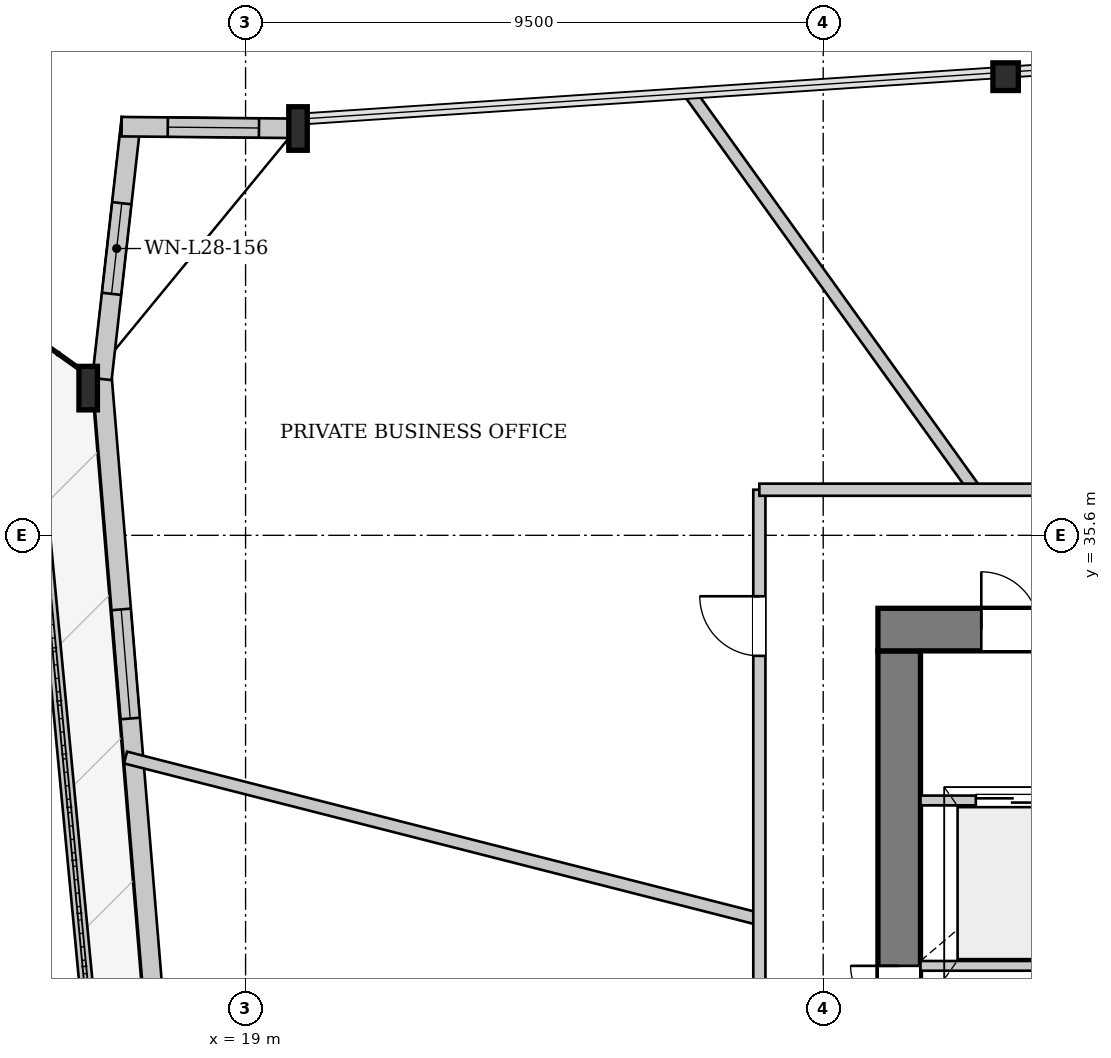
"""IFC4 building model, lengths in metres.
Left out: names, types, materials, properties, quantities, classifications, styles, units other than length and angle.
Written with IfcOpenShell. Run it as: python <this file> out.ifc"""

import sys

from ifc_helpers import new_model, si_unit, direction, frame, frame_2d, origin, origin_2d, place, context, subcontext, project, spatial, rectangle, i_section, extrude, source, transform, mapped, element, fill, save


model = new_model("IFC4")
c1 = context("Model", 3, precision=1e-05, world=origin(), true_north=direction((0.0, 1.0)))
c2 = subcontext(c1, "Body", "Model", "MODEL_VIEW")
j1 = project(units=[si_unit("LENGTHUNIT", "METRE"), si_unit("PLANEANGLEUNIT", "RADIAN")], contexts=[c1])
p1 = place(None, origin())
s1 = spatial("IfcSite", under=j1, at=p1, CompositionType="ELEMENT")
p2 = place(p1, origin())
s2 = spatial("IfcBuilding", under=s1, at=p2, CompositionType="ELEMENT")
p3 = place(p2, frame((0.0, 0.0, 109.25)))
s3 = spatial("IfcBuildingStorey", under=s2, at=p3, CompositionType="ELEMENT", Elevation=109.25)
m1 = source(origin(), c2, "Body", "SweptSolid", [
    extrude(i_section(OverallWidth=0.418, OverallDepth=0.455, WebThickness=0.038, FlangeThickness=0.059, at=origin_2d()), origin(), (0.0, 0.0, 1.0), 3.399),
])
p4 = place(p3, frame((31.631, 43.224, 0.0), z_axis=(-0.077283730653, -0.04797911903, 0.995854019982), x_axis=(0.527441478949, -0.849591364295, 0.0)))
e1 = element("IfcColumn", 1, at=p4, inside=s3, PredefinedType="COLUMN", context=c2, shape_type="MappedRepresentation", body=[
    mapped(m1, transform((0.0, 0.0, 0.0), x_axis=(1.0, 0.0, 0.0), y_axis=(0.0, 1.0, 0.0), z_axis=(0.0, 0.0, 1.0), scale=1.0)),
])
m2 = source(origin(), c2, "Body", "SweptSolid", [
    extrude(i_section(OverallWidth=0.304, OverallDepth=0.716, WebThickness=0.021, FlangeThickness=0.04, at=origin_2d()), origin(), (0.0, 0.0, 1.0), 3.408),
])
p5 = place(p3, frame((19.98, 42.451, 0.0), z_axis=(-0.069050358735, -0.094407025739, 0.99313612433), x_axis=(0.80714420153, -0.59035433253, 0.0)))
e2 = element("IfcColumn", 2, at=p5, inside=s3, PredefinedType="COLUMN", context=c2, shape_type="MappedRepresentation", body=[
    mapped(m2, transform((0.0, 0.0, 0.0), x_axis=(1.0, 0.0, 0.0), y_axis=(0.0, 1.0, 0.0), z_axis=(0.0, 0.0, 1.0), scale=1.0)),
])
m3 = source(origin(), c2, "Body", "SweptSolid", [
    extrude(i_section(OverallWidth=0.304, OverallDepth=0.716, WebThickness=0.021, FlangeThickness=0.04, at=origin_2d()), origin(), (0.0, 0.0, 1.0), 3.404),
])
p6 = place(p3, frame((16.479, 38.188, 0.0), z_axis=(-0.039659803431, -0.098324756788, 0.994363787652), x_axis=(0.927399841512, -0.374071562623, 0.0)))
e3 = element("IfcColumn", 3, at=p6, inside=s3, PredefinedType="COLUMN", context=c2, shape_type="MappedRepresentation", body=[
    mapped(m3, transform((0.0, 0.0, 0.0), x_axis=(1.0, 0.0, 0.0), y_axis=(0.0, 1.0, 0.0), z_axis=(0.0, 0.0, 1.0), scale=1.0)),
])
p7 = place(p3, frame((18.139, 20.062, 0.0), z_axis=(0.0, 0.0, 1.0), x_axis=(-0.082462696948, 0.996594151905, 0.0)))
e4 = element("IfcWall", 4, at=p7, inside=s3, PredefinedType="SOLIDWALL", context=c2, shape_type="SweptSolid", body=[
    extrude(rectangle(XDim=18.202, YDim=0.32, at=frame_2d((9.101, 0.0))), origin(), (0.0, 0.0, 1.0), 2.692),
])
p8 = place(p7, frame((5.275, 0.0, 0.0)))
e5 = element("IfcOpeningElement", 5, at=p8, cuts=e4, PredefinedType="OPENING", context=c2, shape_type="SweptSolid", body=[
    extrude(rectangle(XDim=1.1, YDim=2.3, at=frame_2d((0.55, 1.15))), frame((0.0, 0.17, 0.0), z_axis=(0.0, -1.0, 0.0), x_axis=(1.0, 0.0, 0.0)), (0.0, 0.0, 1.0), 0.34),
])
p9 = place(p7, frame((12.569, 0.0, 0.372)))
e6 = element("IfcOpeningElement", 6, at=p9, cuts=e4, PredefinedType="OPENING", context=c2, shape_type="SweptSolid", body=[
    extrude(rectangle(XDim=1.8, YDim=2.2, at=frame_2d((0.9, 1.1))), frame((0.0, 0.17, 0.0), z_axis=(0.0, -1.0, 0.0), x_axis=(1.0, 0.0, 0.0)), (0.0, 0.0, 1.0), 0.34),
])
p10 = place(p3, frame((16.638, 38.17, 0.0), z_axis=(0.0, 0.0, 1.0), x_axis=(0.112143625954, 0.993692008199, 0.0)))
e7 = element("IfcWall", 7, at=p10, inside=s3, PredefinedType="SOLIDWALL", context=c2, shape_type="SweptSolid", body=[
    extrude(rectangle(XDim=4.319, YDim=0.32, at=frame_2d((2.16, 0.0))), origin(), (0.0, 0.0, 1.0), 2.692),
])
p11 = place(p10, frame((1.41, 0.0, 0.272)))
e8 = element("IfcOpeningElement", 8, at=p11, cuts=e7, PredefinedType="OPENING", context=c2, shape_type="SweptSolid", body=[
    extrude(rectangle(XDim=1.5, YDim=2.3, at=frame_2d((0.75, 1.15))), frame((0.0, 0.17, 0.0), z_axis=(0.0, -1.0, 0.0), x_axis=(1.0, 0.0, 0.0)), (0.0, 0.0, 1.0), 0.34),
])
p12 = place(p3, frame((16.962, 42.32, 0.0), z_axis=(0.0, 0.0, 1.0), x_axis=(0.999952850652, -0.009710637054, 0.0)))
e9 = element("IfcWall", 9, at=p12, inside=s3, PredefinedType="SOLIDWALL", context=c2, shape_type="SweptSolid", body=[
    extrude(rectangle(XDim=3.017, YDim=0.32, at=frame_2d((1.509, 0.0))), origin(), (0.0, 0.0, 1.0), 2.692),
])
p13 = place(p12, frame((0.759, 0.0, 0.272)))
e10 = element("IfcOpeningElement", 10, at=p13, cuts=e9, PredefinedType="OPENING", context=c2, shape_type="SweptSolid", body=[
    extrude(rectangle(XDim=1.5, YDim=2.3, at=frame_2d((0.75, 1.15))), frame((0.0, 0.17, 0.0), z_axis=(0.0, -1.0, 0.0), x_axis=(1.0, 0.0, 0.0)), (0.0, 0.0, 1.0), 0.34),
])
p14 = place(p3, frame((15.501, 37.451, 0.0), z_axis=(0.0, 0.0, 1.0), x_axis=(0.094440121339, -0.995530543721, 0.0)))
e11 = element("IfcWall", 11, at=p14, inside=s3, PredefinedType="PARAPET", context=c2, shape_type="SweptSolid", body=[
    extrude(rectangle(XDim=16.206, YDim=0.22, at=frame_2d((8.103, 0.0))), origin(), (0.0, 0.0, 1.0), 0.3),
])
p15 = place(p3, frame((29.75, 19.5, 0.0), z_axis=(0.0, 0.0, 1.0), x_axis=(0.0, 1.0, 0.0)))
e12 = element("IfcWall", 12, at=p15, inside=s3, PredefinedType="SHEAR", context=c2, shape_type="SweptSolid", body=[
    extrude(rectangle(XDim=14.2, YDim=0.7, at=frame_2d((7.1, 0.0))), origin(), (0.0, 0.0, 1.0), 3.3),
])
p16 = place(p15, frame((7.42, 0.0, 0.0)))
e13 = element("IfcOpeningElement", 13, at=p16, cuts=e12, PredefinedType="OPENING", context=c2, shape_type="SweptSolid", body=[
    extrude(rectangle(XDim=1.6, YDim=2.2, at=frame_2d((0.8, 1.1))), frame((0.0, 0.36, 0.0), z_axis=(0.0, -1.0, 0.0), x_axis=(1.0, 0.0, 0.0)), (0.0, 0.0, 1.0), 0.72),
])
p17 = place(p3, frame((29.4, 34.05, 0.0), z_axis=(0.0, 0.0, 1.0), x_axis=(1.0, 0.0, 0.0)))
e14 = element("IfcWall", 14, at=p17, inside=s3, PredefinedType="SHEAR", context=c2, shape_type="SweptSolid", body=[
    extrude(rectangle(XDim=17.2, YDim=0.7, at=frame_2d((8.6, 0.0))), origin(), (0.0, 0.0, 1.0), 3.3),
])
p18 = place(p17, frame((1.7, 0.0, 0.0)))
e15 = element("IfcOpeningElement", 15, at=p18, cuts=e14, PredefinedType="OPENING", context=c2, shape_type="SweptSolid", body=[
    extrude(rectangle(XDim=0.95, YDim=2.1, at=frame_2d((0.475, 1.05))), frame((0.0, 0.36, 0.0), z_axis=(0.0, -1.0, 0.0), x_axis=(1.0, 0.0, 0.0)), (0.0, 0.0, 1.0), 0.72),
])
p19 = place(p17, frame((4.08, 0.0, 0.0)))
e16 = element("IfcOpeningElement", 16, at=p19, cuts=e14, PredefinedType="OPENING", context=c2, shape_type="SweptSolid", body=[
    extrude(rectangle(XDim=1.32, YDim=2.2, at=frame_2d((0.66, 1.1))), frame((0.0, 0.36, 0.0), z_axis=(0.0, -1.0, 0.0), x_axis=(1.0, 0.0, 0.0)), (0.0, 0.0, 1.0), 0.72),
])
p20 = place(p17, frame((15.15, 0.0, 0.0)))
e17 = element("IfcOpeningElement", 17, at=p20, cuts=e14, PredefinedType="OPENING", context=c2, shape_type="SweptSolid", body=[
    extrude(rectangle(XDim=0.95, YDim=2.1, at=frame_2d((0.475, 1.05))), frame((0.0, 0.36, 0.0), z_axis=(0.0, -1.0, 0.0), x_axis=(1.0, 0.0, 0.0)), (0.0, 0.0, 1.0), 0.72),
])
p21 = place(p3, frame((30.1, 28.52, 0.0), z_axis=(0.0, 0.0, 1.0), x_axis=(1.0, 0.0, 0.0)))
e18 = element("IfcWall", 18, at=p21, inside=s3, PredefinedType="PARTITIONING", context=c2, shape_type="SweptSolid", body=[
    extrude(rectangle(XDim=3.02, YDim=0.16, at=frame_2d((1.51, 0.0))), origin(), (0.0, 0.0, 1.0), 3.3),
])
p22 = place(p3, frame((30.1, 31.24, 0.0), z_axis=(0.0, 0.0, 1.0), x_axis=(1.0, 0.0, 0.0)))
e19 = element("IfcWall", 19, at=p22, inside=s3, PredefinedType="PARTITIONING", context=c2, shape_type="SweptSolid", body=[
    extrude(rectangle(XDim=3.02, YDim=0.16, at=frame_2d((1.51, 0.0))), origin(), (0.0, 0.0, 1.0), 3.3),
])
p23 = place(p22, frame((0.91, 0.0, 0.0)))
e20 = element("IfcOpeningElement", 20, at=p23, cuts=e19, PredefinedType="OPENING", context=c2, shape_type="SweptSolid", body=[
    extrude(rectangle(XDim=1.2, YDim=2.2, at=frame_2d((0.6, 1.1))), frame((0.0, 0.09, 0.0), z_axis=(0.0, -1.0, 0.0), x_axis=(1.0, 0.0, 0.0)), (0.0, 0.0, 1.0), 0.18),
])
p24 = place(p3, frame((30.994, 36.35, 0.0), z_axis=(0.0, 0.0, 1.0), x_axis=(-0.583535361987, 0.812087730058, 0.0)))
e21 = element("IfcWall", 21, at=p24, inside=s3, PredefinedType="PARTITIONING", context=c2, shape_type="SweptSolid", body=[
    extrude(rectangle(XDim=7.994, YDim=0.2, at=frame_2d((3.997, 0.0))), origin(), (0.0, 0.0, 1.0), 3.3),
])
p25 = place(p3, frame((27.45, 29.289, 0.0), z_axis=(0.0, 0.0, 1.0), x_axis=(-0.96902028645, 0.246981141887, 0.0)))
e22 = element("IfcWall", 22, at=p25, inside=s3, PredefinedType="PARTITIONING", context=c2, shape_type="SweptSolid", body=[
    extrude(rectangle(XDim=10.758, YDim=0.2, at=frame_2d((5.379, 0.0))), origin(), (0.0, 0.0, 1.0), 3.3),
])
p26 = place(p3, frame((27.45, 16.85, 0.0), z_axis=(0.0, 0.0, 1.0), x_axis=(0.0, 1.0, 0.0)))
e23 = element("IfcWall", 23, at=p26, inside=s3, PredefinedType="PARTITIONING", context=c2, shape_type="SweptSolid", body=[
    extrude(rectangle(XDim=19.5, YDim=0.2, at=frame_2d((9.75, 0.0))), origin(), (0.0, 0.0, 1.0), 3.3),
])
p27 = place(p26, frame((0.3, 0.0, 0.0)))
e24 = element("IfcOpeningElement", 24, at=p27, cuts=e23, PredefinedType="OPENING", context=c2, shape_type="SweptSolid", body=[
    extrude(rectangle(XDim=0.98, YDim=2.15, at=frame_2d((0.49, 1.075))), frame((0.0, 0.11, 0.0), z_axis=(0.0, -1.0, 0.0), x_axis=(1.0, 0.0, 0.0)), (0.0, 0.0, 1.0), 0.22),
])
p28 = place(p26, frame((16.768, 0.0, 0.0)))
e25 = element("IfcOpeningElement", 25, at=p28, cuts=e23, PredefinedType="OPENING", context=c2, shape_type="SweptSolid", body=[
    extrude(rectangle(XDim=0.98, YDim=2.15, at=frame_2d((0.49, 1.075))), frame((0.0, 0.11, 0.0), z_axis=(0.0, -1.0, 0.0), x_axis=(1.0, 0.0, 0.0)), (0.0, 0.0, 1.0), 0.22),
])
p29 = place(p26, frame((9.362, 0.0, 0.0)))
e26 = element("IfcOpeningElement", 26, at=p29, cuts=e23, PredefinedType="OPENING", context=c2, shape_type="SweptSolid", body=[
    extrude(rectangle(XDim=0.98, YDim=2.15, at=frame_2d((0.49, 1.075))), frame((0.0, 0.11, 0.0), z_axis=(0.0, -1.0, 0.0), x_axis=(1.0, 0.0, 0.0)), (0.0, 0.0, 1.0), 0.22),
])
p30 = place(p3, frame((27.45, 36.35, 0.0), z_axis=(0.0, 0.0, 1.0), x_axis=(1.0, 0.0, 0.0)))
e27 = element("IfcWall", 27, at=p30, inside=s3, PredefinedType="PARTITIONING", context=c2, shape_type="SweptSolid", body=[
    extrude(rectangle(XDim=21.1, YDim=0.2, at=frame_2d((10.55, 0.0))), origin(), (0.0, 0.0, 1.0), 3.3),
])
p31 = place(p30, frame((18.598, 0.0, 0.0)))
e28 = element("IfcOpeningElement", 28, at=p31, cuts=e27, PredefinedType="OPENING", context=c2, shape_type="SweptSolid", body=[
    extrude(rectangle(XDim=0.98, YDim=2.15, at=frame_2d((0.49, 1.075))), frame((0.0, 0.11, 0.0), z_axis=(0.0, -1.0, 0.0), x_axis=(1.0, 0.0, 0.0)), (0.0, 0.0, 1.0), 0.22),
])
p32 = place(p30, frame((5.273, 0.0, 0.0)))
e29 = element("IfcOpeningElement", 29, at=p32, cuts=e27, PredefinedType="OPENING", context=c2, shape_type="SweptSolid", body=[
    extrude(rectangle(XDim=0.98, YDim=2.15, at=frame_2d((0.49, 1.075))), frame((0.0, 0.11, 0.0), z_axis=(0.0, -1.0, 0.0), x_axis=(1.0, 0.0, 0.0)), (0.0, 0.0, 1.0), 0.22),
])
m4 = source(origin(), c2, "Body", "SweptSolid", [
    extrude(rectangle(XDim=1.8, YDim=2.2, at=frame_2d((0.9, 1.1))), frame((0.0, 0.03, 0.0), z_axis=(0.0, -1.0, 0.0), x_axis=(1.0, 0.0, 0.0)), (0.0, 0.0, 1.0), 0.06),
])
p33 = place(p9, origin())
e30 = element("IfcWindow", 30, at=p33, inside=s3, PartitioningType="SINGLE_PANEL", PredefinedType="WINDOW", context=c2, shape_type="MappedRepresentation", body=[
    mapped(m4, transform((0.0, 0.0, 0.0), x_axis=(1.0, 0.0, 0.0), y_axis=(0.0, 1.0, 0.0), z_axis=(0.0, 0.0, 1.0), scale=1.0)),
])
fill(e6, e30)
m5 = source(origin(), c2, "Body", "SweptSolid", [
    extrude(rectangle(XDim=1.5, YDim=2.3, at=frame_2d((0.75, 1.15))), frame((0.0, 0.03, 0.0), z_axis=(0.0, -1.0, 0.0), x_axis=(1.0, 0.0, 0.0)), (0.0, 0.0, 1.0), 0.06),
])
p34 = place(p11, origin())
e31 = element("IfcWindow", 31, at=p34, inside=s3, PartitioningType="SINGLE_PANEL", PredefinedType="WINDOW", context=c2, shape_type="MappedRepresentation", body=[
    mapped(m5, transform((0.0, 0.0, 0.0), x_axis=(1.0, 0.0, 0.0), y_axis=(0.0, 1.0, 0.0), z_axis=(0.0, 0.0, 1.0), scale=1.0)),
])
fill(e8, e31)
p35 = place(p13, origin())
e32 = element("IfcWindow", 32, at=p35, inside=s3, PartitioningType="SINGLE_PANEL", PredefinedType="WINDOW", context=c2, shape_type="MappedRepresentation", body=[
    mapped(m5, transform((0.0, 0.0, 0.0), x_axis=(1.0, 0.0, 0.0), y_axis=(0.0, 1.0, 0.0), z_axis=(0.0, 0.0, 1.0), scale=1.0)),
])
fill(e10, e32)
m6 = source(origin(), c2, "Body", "SweptSolid", [
    extrude(rectangle(XDim=1.6, YDim=2.2, at=frame_2d((0.8, 1.1))), frame((0.0, 0.025, 0.0), z_axis=(0.0, -1.0, 0.0), x_axis=(1.0, 0.0, 0.0)), (0.0, 0.0, 1.0), 0.05),
])
p36 = place(p16, origin())
e33 = element("IfcDoor", 33, at=p36, inside=s3, OperationType="DOUBLE_DOOR_SINGLE_SWING", PredefinedType="DOOR", context=c2, shape_type="MappedRepresentation", body=[
    mapped(m6, transform((0.0, 0.0, 0.0), x_axis=(1.0, 0.0, 0.0), y_axis=(0.0, 1.0, 0.0), z_axis=(0.0, 0.0, 1.0), scale=1.0)),
])
fill(e13, e33)
m7 = source(origin(), c2, "Body", "SweptSolid", [
    extrude(rectangle(XDim=0.95, YDim=2.1, at=frame_2d((0.475, 1.05))), frame((0.0, 0.025, 0.0), z_axis=(0.0, -1.0, 0.0), x_axis=(1.0, 0.0, 0.0)), (0.0, 0.0, 1.0), 0.05),
])
p37 = place(p18, origin())
e34 = element("IfcDoor", 34, at=p37, inside=s3, OperationType="SINGLE_SWING_LEFT", PredefinedType="DOOR", context=c2, shape_type="MappedRepresentation", body=[
    mapped(m7, transform((0.0, 0.0, 0.0), x_axis=(1.0, 0.0, 0.0), y_axis=(0.0, 1.0, 0.0), z_axis=(0.0, 0.0, 1.0), scale=1.0)),
])
fill(e15, e34)
m8 = source(origin(), c2, "Body", "SweptSolid", [
    extrude(rectangle(XDim=1.2, YDim=2.2, at=frame_2d((0.6, 1.1))), frame((0.0, 0.025, 0.0), z_axis=(0.0, -1.0, 0.0), x_axis=(1.0, 0.0, 0.0)), (0.0, 0.0, 1.0), 0.05),
])
p38 = place(p23, origin())
e35 = element("IfcDoor", 35, at=p38, inside=s3, OperationType="DOUBLE_DOOR_SLIDING", PredefinedType="DOOR", context=c2, shape_type="MappedRepresentation", body=[
    mapped(m8, transform((0.0, 0.0, 0.0), x_axis=(1.0, 0.0, 0.0), y_axis=(0.0, 1.0, 0.0), z_axis=(0.0, 0.0, 1.0), scale=1.0)),
])
fill(e20, e35)
m9 = source(origin(), c2, "Body", "SweptSolid", [
    extrude(rectangle(XDim=0.98, YDim=2.15, at=frame_2d((0.49, 1.075))), frame((0.0, 0.025, 0.0), z_axis=(0.0, -1.0, 0.0), x_axis=(1.0, 0.0, 0.0)), (0.0, 0.0, 1.0), 0.05),
])
p39 = place(p28, origin())
e36 = element("IfcDoor", 36, at=p39, inside=s3, OperationType="SINGLE_SWING_RIGHT", PredefinedType="DOOR", context=c2, shape_type="MappedRepresentation", body=[
    mapped(m9, transform((0.0, 0.0, 0.0), x_axis=(1.0, 0.0, 0.0), y_axis=(0.0, 1.0, 0.0), z_axis=(0.0, 0.0, 1.0), scale=1.0)),
])
fill(e25, e36)
save(model, sys.argv[1])
